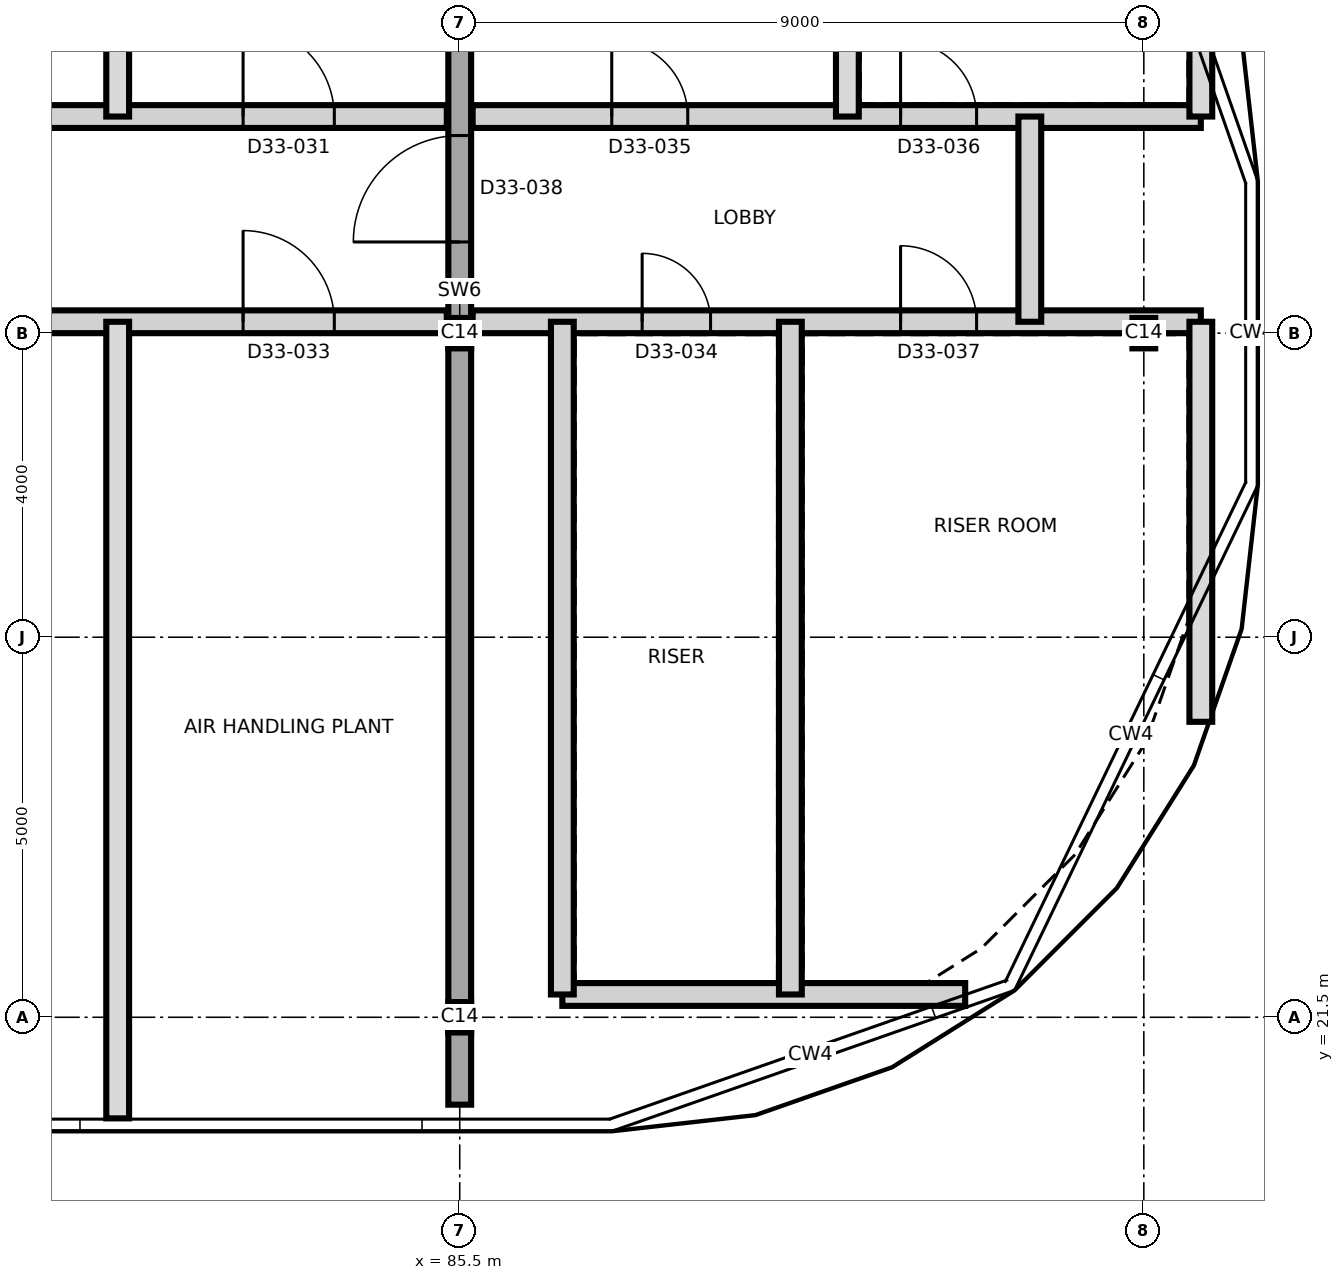
"""IFC4 building model, lengths in metres.
Left out: names, types, materials, properties, quantities, classifications, styles, units other than length and angle.
Written with IfcOpenShell. Run it as: python <this file> out.ifc"""

import sys

from ifc_helpers import new_model, si_unit, direction, frame, frame_2d, origin, origin_2d, place, context, subcontext, project, spatial, rectangle, i_section, extrude, element, fill, save


model = new_model("IFC4")
c1 = context("Model", 3, precision=1e-05, world=origin(), true_north=direction((0.0, 1.0)))
c2 = subcontext(c1, "Body", "Model", "MODEL_VIEW")
j1 = project(units=[si_unit("LENGTHUNIT", "METRE"), si_unit("PLANEANGLEUNIT", "RADIAN")], contexts=[c1])
p1 = place(None, origin())
s1 = spatial("IfcSite", under=j1, at=p1, CompositionType="ELEMENT")
p2 = place(p1, origin())
s2 = spatial("IfcBuilding", under=s1, at=p2, CompositionType="ELEMENT")
p3 = place(p2, frame((0.0, 0.0, 277.1)))
s3 = spatial("IfcBuildingStorey", under=s2, at=p3, CompositionType="ELEMENT", Elevation=277.1)
p4 = place(p3, frame((85.5, 20.35, 0.0), z_axis=(0.0, 0.0, 1.0), x_axis=(0.0, 1.0, 0.0)))
e1 = element("IfcWall", 1, at=p4, inside=s3, PredefinedType="SHEAR", context=c2, shape_type="SweptSolid", body=[
    extrude(rectangle(XDim=20.3, YDim=0.3, at=frame_2d((10.15, 0.0))), origin(), (0.0, 0.0, 1.0), 4.2),
])
p5 = place(p4, frame((11.35, 0.0, 0.0)))
e2 = element("IfcOpeningElement", 2, at=p5, cuts=e1, PredefinedType="OPENING", context=c2, shape_type="SweptSolid", body=[
    extrude(rectangle(XDim=1.4, YDim=2.1, at=frame_2d((0.7, 1.05))), frame((0.0, 0.16, 0.0), z_axis=(0.0, -1.0, 0.0), x_axis=(1.0, 0.0, 0.0)), (0.0, 0.0, 1.0), 0.32),
])
for number, where, z_axis, x_axis in (
    (3, (85.5, 21.5, 0.0), (0.0, 0.0, 1.0), (1.0, 0.0, 0.0)),
    (4, (85.5, 30.5, 0.0), (0.0, 0.0, 1.0), (1.0, 0.0, 0.0)),
    (5, (94.5, 30.5, 0.0), (0.0, 0.0, 1.0), (1.0, 0.0, 0.0)),
):
    element("IfcColumn", number, at=place(p3, frame(where, z_axis=z_axis, x_axis=x_axis)), inside=s3, PredefinedType="COLUMN", context=c2, shape_type="SweptSolid", body=[
        extrude(i_section(OverallWidth=0.3, OverallDepth=0.4, WebThickness=0.013, FlangeThickness=0.024, FilletRadius=0.027, at=origin_2d()), origin(), (0.0, 0.0, 1.0), 4.2),
    ])
p6 = place(p3, frame((86.85, 21.8, 0.0), z_axis=(0.0, 0.0, 1.0), x_axis=(1.0, 0.0, 0.0)))
e6 = element("IfcWall", 6, at=p6, inside=s3, PredefinedType="PARTITIONING", context=c2, shape_type="SweptSolid", body=[
    extrude(rectangle(XDim=5.3, YDim=0.3, at=frame_2d((2.65, 0.0))), origin(), (0.0, 0.0, 1.0), 3.9),
])
p7 = place(p3, frame((58.55, 30.65, 0.0), z_axis=(0.0, 0.0, 1.0), x_axis=(1.0, 0.0, 0.0)))
e7 = element("IfcWall", 7, at=p7, inside=s3, PredefinedType="PARTITIONING", context=c2, shape_type="SweptSolid", body=[
    extrude(rectangle(XDim=26.78, YDim=0.3, at=frame_2d((13.39, 0.0))), origin(), (0.0, 0.0, 1.0), 3.9),
])
p8 = place(p7, frame((1.6, 0.0, 0.0)))
e8 = element("IfcOpeningElement", 8, at=p8, cuts=e7, PredefinedType="OPENING", context=c2, shape_type="SweptSolid", body=[
    extrude(rectangle(XDim=1.2, YDim=2.1, at=frame_2d((0.6, 1.05))), frame((0.0, 0.16, 0.0), z_axis=(0.0, -1.0, 0.0), x_axis=(1.0, 0.0, 0.0)), (0.0, 0.0, 1.0), 0.32),
])
p9 = place(p7, frame((6.1, 0.0, 0.0)))
e9 = element("IfcOpeningElement", 9, at=p9, cuts=e7, PredefinedType="OPENING", context=c2, shape_type="SweptSolid", body=[
    extrude(rectangle(XDim=1.2, YDim=2.1, at=frame_2d((0.6, 1.05))), frame((0.0, 0.16, 0.0), z_axis=(0.0, -1.0, 0.0), x_axis=(1.0, 0.0, 0.0)), (0.0, 0.0, 1.0), 0.32),
])
p10 = place(p7, frame((10.6, 0.0, 0.0)))
e10 = element("IfcOpeningElement", 10, at=p10, cuts=e7, PredefinedType="OPENING", context=c2, shape_type="SweptSolid", body=[
    extrude(rectangle(XDim=1.2, YDim=2.1, at=frame_2d((0.6, 1.05))), frame((0.0, 0.16, 0.0), z_axis=(0.0, -1.0, 0.0), x_axis=(1.0, 0.0, 0.0)), (0.0, 0.0, 1.0), 0.32),
])
p11 = place(p7, frame((15.1, 0.0, 0.0)))
e11 = element("IfcOpeningElement", 11, at=p11, cuts=e7, PredefinedType="OPENING", context=c2, shape_type="SweptSolid", body=[
    extrude(rectangle(XDim=1.2, YDim=2.1, at=frame_2d((0.6, 1.05))), frame((0.0, 0.16, 0.0), z_axis=(0.0, -1.0, 0.0), x_axis=(1.0, 0.0, 0.0)), (0.0, 0.0, 1.0), 0.32),
])
p12 = place(p7, frame((19.6, 0.0, 0.0)))
e12 = element("IfcOpeningElement", 12, at=p12, cuts=e7, PredefinedType="OPENING", context=c2, shape_type="SweptSolid", body=[
    extrude(rectangle(XDim=1.2, YDim=2.1, at=frame_2d((0.6, 1.05))), frame((0.0, 0.16, 0.0), z_axis=(0.0, -1.0, 0.0), x_axis=(1.0, 0.0, 0.0)), (0.0, 0.0, 1.0), 0.32),
])
p13 = place(p7, frame((24.1, 0.0, 0.0)))
e13 = element("IfcOpeningElement", 13, at=p13, cuts=e7, PredefinedType="OPENING", context=c2, shape_type="SweptSolid", body=[
    extrude(rectangle(XDim=1.2, YDim=2.1, at=frame_2d((0.6, 1.05))), frame((0.0, 0.16, 0.0), z_axis=(0.0, -1.0, 0.0), x_axis=(1.0, 0.0, 0.0)), (0.0, 0.0, 1.0), 0.32),
])
p14 = place(p3, frame((85.67, 30.65, 0.0), z_axis=(0.0, 0.0, 1.0), x_axis=(1.0, 0.0, 0.0)))
e14 = element("IfcWall", 14, at=p14, inside=s3, PredefinedType="PARTITIONING", context=c2, shape_type="SweptSolid", body=[
    extrude(rectangle(XDim=9.58, YDim=0.3, at=frame_2d((4.79, 0.0))), origin(), (0.0, 0.0, 1.0), 3.9),
])
p15 = place(p14, frame((2.23, 0.0, 0.0)))
e15 = element("IfcOpeningElement", 15, at=p15, cuts=e14, PredefinedType="OPENING", context=c2, shape_type="SweptSolid", body=[
    extrude(rectangle(XDim=0.9, YDim=2.1, at=frame_2d((0.45, 1.05))), frame((0.0, 0.16, 0.0), z_axis=(0.0, -1.0, 0.0), x_axis=(1.0, 0.0, 0.0)), (0.0, 0.0, 1.0), 0.32),
])
p16 = place(p14, frame((5.63, 0.0, 0.0)))
e16 = element("IfcOpeningElement", 16, at=p16, cuts=e14, PredefinedType="OPENING", context=c2, shape_type="SweptSolid", body=[
    extrude(rectangle(XDim=1.0, YDim=2.1, at=frame_2d((0.5, 1.05))), frame((0.0, 0.16, 0.0), z_axis=(0.0, -1.0, 0.0), x_axis=(1.0, 0.0, 0.0)), (0.0, 0.0, 1.0), 0.32),
])
p17 = place(p3, frame((58.55, 33.35, 0.0), z_axis=(0.0, 0.0, 1.0), x_axis=(1.0, 0.0, 0.0)))
e17 = element("IfcWall", 17, at=p17, inside=s3, PredefinedType="PARTITIONING", context=c2, shape_type="SweptSolid", body=[
    extrude(rectangle(XDim=26.78, YDim=0.3, at=frame_2d((13.39, 0.0))), origin(), (0.0, 0.0, 1.0), 3.9),
])
p18 = place(p17, frame((1.6, 0.0, 0.0)))
e18 = element("IfcOpeningElement", 18, at=p18, cuts=e17, PredefinedType="OPENING", context=c2, shape_type="SweptSolid", body=[
    extrude(rectangle(XDim=1.2, YDim=2.1, at=frame_2d((0.6, 1.05))), frame((0.0, 0.16, 0.0), z_axis=(0.0, -1.0, 0.0), x_axis=(1.0, 0.0, 0.0)), (0.0, 0.0, 1.0), 0.32),
])
p19 = place(p17, frame((6.1, 0.0, 0.0)))
e19 = element("IfcOpeningElement", 19, at=p19, cuts=e17, PredefinedType="OPENING", context=c2, shape_type="SweptSolid", body=[
    extrude(rectangle(XDim=1.2, YDim=2.1, at=frame_2d((0.6, 1.05))), frame((0.0, 0.16, 0.0), z_axis=(0.0, -1.0, 0.0), x_axis=(1.0, 0.0, 0.0)), (0.0, 0.0, 1.0), 0.32),
])
p20 = place(p17, frame((10.6, 0.0, 0.0)))
e20 = element("IfcOpeningElement", 20, at=p20, cuts=e17, PredefinedType="OPENING", context=c2, shape_type="SweptSolid", body=[
    extrude(rectangle(XDim=1.2, YDim=2.1, at=frame_2d((0.6, 1.05))), frame((0.0, 0.16, 0.0), z_axis=(0.0, -1.0, 0.0), x_axis=(1.0, 0.0, 0.0)), (0.0, 0.0, 1.0), 0.32),
])
p21 = place(p17, frame((15.1, 0.0, 0.0)))
e21 = element("IfcOpeningElement", 21, at=p21, cuts=e17, PredefinedType="OPENING", context=c2, shape_type="SweptSolid", body=[
    extrude(rectangle(XDim=1.2, YDim=2.1, at=frame_2d((0.6, 1.05))), frame((0.0, 0.16, 0.0), z_axis=(0.0, -1.0, 0.0), x_axis=(1.0, 0.0, 0.0)), (0.0, 0.0, 1.0), 0.32),
])
p22 = place(p17, frame((19.6, 0.0, 0.0)))
e22 = element("IfcOpeningElement", 22, at=p22, cuts=e17, PredefinedType="OPENING", context=c2, shape_type="SweptSolid", body=[
    extrude(rectangle(XDim=1.2, YDim=2.1, at=frame_2d((0.6, 1.05))), frame((0.0, 0.16, 0.0), z_axis=(0.0, -1.0, 0.0), x_axis=(1.0, 0.0, 0.0)), (0.0, 0.0, 1.0), 0.32),
])
p23 = place(p17, frame((24.1, 0.0, 0.0)))
e23 = element("IfcOpeningElement", 23, at=p23, cuts=e17, PredefinedType="OPENING", context=c2, shape_type="SweptSolid", body=[
    extrude(rectangle(XDim=1.2, YDim=2.1, at=frame_2d((0.6, 1.05))), frame((0.0, 0.16, 0.0), z_axis=(0.0, -1.0, 0.0), x_axis=(1.0, 0.0, 0.0)), (0.0, 0.0, 1.0), 0.32),
])
p24 = place(p3, frame((85.67, 33.35, 0.0), z_axis=(0.0, 0.0, 1.0), x_axis=(1.0, 0.0, 0.0)))
e24 = element("IfcWall", 24, at=p24, inside=s3, PredefinedType="PARTITIONING", context=c2, shape_type="SweptSolid", body=[
    extrude(rectangle(XDim=9.58, YDim=0.3, at=frame_2d((4.79, 0.0))), origin(), (0.0, 0.0, 1.0), 3.9),
])
p25 = place(p24, frame((1.83, 0.0, 0.0)))
e25 = element("IfcOpeningElement", 25, at=p25, cuts=e24, PredefinedType="OPENING", context=c2, shape_type="SweptSolid", body=[
    extrude(rectangle(XDim=1.0, YDim=2.1, at=frame_2d((0.5, 1.05))), frame((0.0, 0.16, 0.0), z_axis=(0.0, -1.0, 0.0), x_axis=(1.0, 0.0, 0.0)), (0.0, 0.0, 1.0), 0.32),
])
p26 = place(p24, frame((5.63, 0.0, 0.0)))
e26 = element("IfcOpeningElement", 26, at=p26, cuts=e24, PredefinedType="OPENING", context=c2, shape_type="SweptSolid", body=[
    extrude(rectangle(XDim=1.0, YDim=2.1, at=frame_2d((0.5, 1.05))), frame((0.0, 0.16, 0.0), z_axis=(0.0, -1.0, 0.0), x_axis=(1.0, 0.0, 0.0)), (0.0, 0.0, 1.0), 0.32),
])
p27 = place(p3, frame((81.0, 20.17, 0.0), z_axis=(0.0, 0.0, 1.0), x_axis=(0.0, 1.0, 0.0)))
e27 = element("IfcWall", 27, at=p27, inside=s3, PredefinedType="PARTITIONING", context=c2, shape_type="SweptSolid", body=[
    extrude(rectangle(XDim=10.48, YDim=0.3, at=frame_2d((5.24, 0.0))), origin(), (0.0, 0.0, 1.0), 3.9),
])
p28 = place(p3, frame((81.0, 33.35, 0.0), z_axis=(0.0, 0.0, 1.0), x_axis=(0.0, 1.0, 0.0)))
e28 = element("IfcWall", 28, at=p28, inside=s3, PredefinedType="PARTITIONING", context=c2, shape_type="SweptSolid", body=[
    extrude(rectangle(XDim=7.48, YDim=0.3, at=frame_2d((3.74, 0.0))), origin(), (0.0, 0.0, 1.0), 3.9),
])
for number, where, z_axis, x_axis in (
    (29, (86.85, 21.8, 0.0), (0.0, 0.0, 1.0), (0.0, 1.0, 0.0)),
    (30, (89.85, 21.8, 0.0), (0.0, 0.0, 1.0), (0.0, 1.0, 0.0)),
):
    element("IfcWall", number, at=place(p3, frame(where, z_axis=z_axis, x_axis=x_axis)), inside=s3, PredefinedType="PARTITIONING", context=c2, shape_type="SweptSolid", body=[
        extrude(rectangle(XDim=8.85, YDim=0.3, at=frame_2d((4.425, 0.0))), origin(), (0.0, 0.0, 1.0), 3.9),
    ])
p29 = place(p3, frame((90.6, 33.35, 0.0), z_axis=(0.0, 0.0, 1.0), x_axis=(0.0, 1.0, 0.0)))
e31 = element("IfcWall", 31, at=p29, inside=s3, PredefinedType="PARTITIONING", context=c2, shape_type="SweptSolid", body=[
    extrude(rectangle(XDim=6.898, YDim=0.3, at=frame_2d((3.449, 0.0))), origin(), (0.0, 0.0, 1.0), 3.9),
])
p30 = place(p3, frame((93.0, 30.65, 0.0), z_axis=(0.0, 0.0, 1.0), x_axis=(0.0, 1.0, 0.0)))
e32 = element("IfcWall", 32, at=p30, inside=s3, PredefinedType="PARTITIONING", context=c2, shape_type="SweptSolid", body=[
    extrude(rectangle(XDim=2.7, YDim=0.3, at=frame_2d((1.35, 0.0))), origin(), (0.0, 0.0, 1.0), 3.9),
])
p31 = place(p3, frame((95.25, 25.387, 0.0), z_axis=(0.0, 0.0, 1.0), x_axis=(0.0, 1.0, 0.0)))
e33 = element("IfcWall", 33, at=p31, inside=s3, PredefinedType="PARTITIONING", context=c2, shape_type="SweptSolid", body=[
    extrude(rectangle(XDim=5.263, YDim=0.3, at=frame_2d((2.631, 0.0))), origin(), (0.0, 0.0, 1.0), 3.9),
])
p32 = place(p3, frame((95.25, 33.35, 0.0), z_axis=(0.0, 0.0, 1.0), x_axis=(0.0, 1.0, 0.0)))
e34 = element("IfcWall", 34, at=p32, inside=s3, PredefinedType="PARTITIONING", context=c2, shape_type="SweptSolid", body=[
    extrude(rectangle(XDim=2.263, YDim=0.3, at=frame_2d((1.131, 0.0))), origin(), (0.0, 0.0, 1.0), 3.9),
])
p33 = place(p23, origin())
e35 = element("IfcDoor", 35, at=p33, inside=s3, OperationType="SINGLE_SWING_LEFT", PredefinedType="DOOR", context=c2, shape_type="SweptSolid", body=[
    extrude(rectangle(XDim=1.2, YDim=2.1, at=frame_2d((0.6, 1.05))), frame((0.0, 0.025, 0.0), z_axis=(0.0, -1.0, 0.0), x_axis=(1.0, 0.0, 0.0)), (0.0, 0.0, 1.0), 0.05),
])
fill(e23, e35)
p34 = place(p13, origin())
e36 = element("IfcDoor", 36, at=p34, inside=s3, OperationType="SINGLE_SWING_RIGHT", PredefinedType="DOOR", context=c2, shape_type="SweptSolid", body=[
    extrude(rectangle(XDim=1.2, YDim=2.1, at=frame_2d((0.6, 1.05))), frame((0.0, 0.025, 0.0), z_axis=(0.0, -1.0, 0.0), x_axis=(1.0, 0.0, 0.0)), (0.0, 0.0, 1.0), 0.05),
])
fill(e13, e36)
p35 = place(p15, origin())
e37 = element("IfcDoor", 37, at=p35, inside=s3, OperationType="SINGLE_SWING_LEFT", PredefinedType="DOOR", context=c2, shape_type="SweptSolid", body=[
    extrude(rectangle(XDim=0.9, YDim=2.1, at=frame_2d((0.45, 1.05))), frame((0.0, 0.025, 0.0), z_axis=(0.0, -1.0, 0.0), x_axis=(1.0, 0.0, 0.0)), (0.0, 0.0, 1.0), 0.05),
])
fill(e15, e37)
p36 = place(p25, origin())
e38 = element("IfcDoor", 38, at=p36, inside=s3, OperationType="SINGLE_SWING_LEFT", PredefinedType="DOOR", context=c2, shape_type="SweptSolid", body=[
    extrude(rectangle(XDim=1.0, YDim=2.1, at=frame_2d((0.5, 1.05))), frame((0.0, 0.025, 0.0), z_axis=(0.0, -1.0, 0.0), x_axis=(1.0, 0.0, 0.0)), (0.0, 0.0, 1.0), 0.05),
])
fill(e25, e38)
p37 = place(p26, origin())
e39 = element("IfcDoor", 39, at=p37, inside=s3, OperationType="SINGLE_SWING_RIGHT", PredefinedType="DOOR", context=c2, shape_type="SweptSolid", body=[
    extrude(rectangle(XDim=1.0, YDim=2.1, at=frame_2d((0.5, 1.05))), frame((0.0, 0.025, 0.0), z_axis=(0.0, -1.0, 0.0), x_axis=(1.0, 0.0, 0.0)), (0.0, 0.0, 1.0), 0.05),
])
fill(e26, e39)
p38 = place(p16, origin())
e40 = element("IfcDoor", 40, at=p38, inside=s3, OperationType="SINGLE_SWING_LEFT", PredefinedType="DOOR", context=c2, shape_type="SweptSolid", body=[
    extrude(rectangle(XDim=1.0, YDim=2.1, at=frame_2d((0.5, 1.05))), frame((0.0, 0.025, 0.0), z_axis=(0.0, -1.0, 0.0), x_axis=(1.0, 0.0, 0.0)), (0.0, 0.0, 1.0), 0.05),
])
fill(e16, e40)
p39 = place(p5, origin())
e41 = element("IfcDoor", 41, at=p39, inside=s3, OperationType="SINGLE_SWING_RIGHT", PredefinedType="DOOR", context=c2, shape_type="SweptSolid", body=[
    extrude(rectangle(XDim=1.4, YDim=2.1, at=frame_2d((0.7, 1.05))), frame((0.0, 0.025, 0.0), z_axis=(0.0, -1.0, 0.0), x_axis=(1.0, 0.0, 0.0)), (0.0, 0.0, 1.0), 0.05),
])
fill(e2, e41)
save(model, sys.argv[1])
